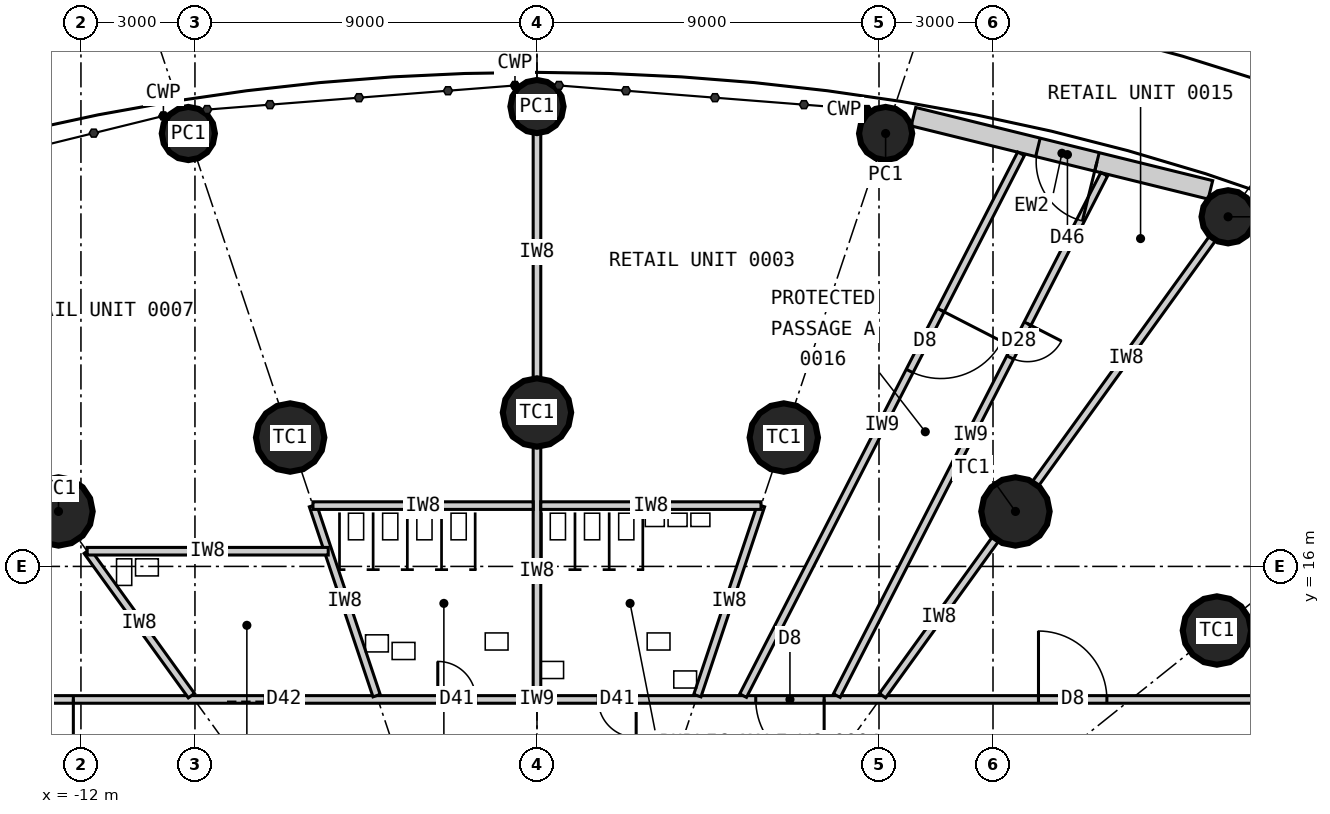
"""IFC4 building model, lengths in metres.
Left out: names, types, materials, properties, quantities, classifications, styles, units other than length and angle.
Written with IfcOpenShell. Run it as: python <this file> out.ifc"""

import sys

from ifc_helpers import new_model, si_unit, direction, frame, frame_2d, origin, origin_2d, place, context, subcontext, project, spatial, rectangle, circle, extrude, element, fill, save


model = new_model("IFC4")
c1 = context("Model", 3, precision=1e-05, world=origin(), true_north=direction((0.0, 1.0)))
c2 = subcontext(c1, "Body", "Model", "MODEL_VIEW")
j1 = project(units=[si_unit("LENGTHUNIT", "METRE"), si_unit("PLANEANGLEUNIT", "RADIAN")], contexts=[c1])
p1 = place(None, origin())
s1 = spatial("IfcSite", under=j1, at=p1, CompositionType="ELEMENT")
p2 = place(p1, origin())
s2 = spatial("IfcBuilding", under=s1, at=p2, CompositionType="ELEMENT")
p3 = place(p2, origin())
s3 = spatial("IfcBuildingStorey", under=s2, at=p3, CompositionType="ELEMENT", Elevation=0.0)
for number, where, z_axis, x_axis in (
    (1, (17.892, 14.313, 0.0), (0.0, 0.0, 1.0), (1.0, 0.0, 0.0)),
    (2, (12.591, 17.447, 0.0), (0.0, 0.0, 1.0), (1.0, 0.0, 0.0)),
    (3, (6.495, 19.391, 0.0), (0.0, 0.0, 1.0), (1.0, 0.0, 0.0)),
    (4, (0.0, 20.05, 0.0), (0.0, 0.0, 1.0), (1.0, 0.0, 0.0)),
    (5, (-6.495, 19.391, 0.0), (0.0, 0.0, 1.0), (1.0, 0.0, 0.0)),
    (6, (-12.591, 17.447, 0.0), (0.0, 0.0, 1.0), (1.0, 0.0, 0.0)),
):
    element("IfcColumn", number, at=place(p3, frame(where, z_axis=z_axis, x_axis=x_axis)), inside=s3, PredefinedType="COLUMN", context=c2, shape_type="SweptSolid", body=[
        extrude(circle(Radius=0.9, at=origin_2d()), origin(), (0.0, 0.0, 1.0), 7.2),
    ])
for number, where, z_axis, x_axis in (
    (7, (18.186, 25.199, 0.0), (0.0, 0.0, 1.0), (1.0, 0.0, 0.0)),
    (8, (9.174, 27.391, 0.0), (0.0, 0.0, 1.0), (1.0, 0.0, 0.0)),
    (9, (0.0, 28.1, 0.0), (0.0, 0.0, 1.0), (1.0, 0.0, 0.0)),
    (10, (-9.174, 27.391, 0.0), (0.0, 0.0, 1.0), (1.0, 0.0, 0.0)),
):
    element("IfcColumn", number, at=place(p3, frame(where, z_axis=z_axis, x_axis=x_axis)), inside=s3, PredefinedType="COLUMN", context=c2, shape_type="SweptSolid", body=[
        extrude(circle(Radius=0.7, at=origin_2d()), origin(), (0.0, 0.0, 1.0), 7.2),
    ])
p4 = place(p3, frame((17.721, 25.908, 0.0), z_axis=(0.0, 0.0, 1.0), x_axis=(-0.970964815964, 0.23922233625, 0.0)))
e11 = element("IfcWall", 11, at=p4, inside=s3, PredefinedType="SOLIDWALL", context=c2, shape_type="SweptSolid", body=[
    extrude(rectangle(XDim=8.048, YDim=0.5, at=frame_2d((4.024, 0.0))), origin(), (0.0, 0.0, 1.0), 6.95),
])
p5 = place(p4, frame((3.075, 0.0, 0.0)))
e12 = element("IfcOpeningElement", 12, at=p5, cuts=e11, PredefinedType="OPENING", context=c2, shape_type="SweptSolid", body=[
    extrude(rectangle(XDim=1.6, YDim=2.1, at=frame_2d((0.8, 1.05))), frame((0.0, 0.26, 0.0), z_axis=(0.0, -1.0, 0.0), x_axis=(1.0, 0.0, 0.0)), (0.0, 0.0, 1.0), 0.52),
])
p6 = place(p3, frame((-19.1, 12.5, 0.0), z_axis=(0.0, 0.0, 1.0), x_axis=(1.0, 0.0, 0.0)))
e13 = element("IfcWall", 13, at=p6, inside=s3, PredefinedType="PARTITIONING", context=c2, shape_type="SweptSolid", body=[
    extrude(rectangle(XDim=38.2, YDim=0.2, at=frame_2d((19.1, 0.0))), origin(), (0.0, 0.0, 1.0), 6.95),
])
p7 = place(p6, frame((32.297, 0.0, 0.0)))
e14 = element("IfcOpeningElement", 14, at=p7, cuts=e13, PredefinedType="OPENING", context=c2, shape_type="SweptSolid", body=[
    extrude(rectangle(XDim=1.8, YDim=2.4, at=frame_2d((0.9, 1.2))), frame((0.0, 0.11, 0.0), z_axis=(0.0, -1.0, 0.0), x_axis=(1.0, 0.0, 0.0)), (0.0, 0.0, 1.0), 0.22),
])
p8 = place(p6, frame((24.857, 0.0, 0.0)))
e15 = element("IfcOpeningElement", 15, at=p8, cuts=e13, PredefinedType="OPENING", context=c2, shape_type="SweptSolid", body=[
    extrude(rectangle(XDim=1.8, YDim=2.4, at=frame_2d((0.9, 1.2))), frame((0.0, 0.11, 0.0), z_axis=(0.0, -1.0, 0.0), x_axis=(1.0, 0.0, 0.0)), (0.0, 0.0, 1.0), 0.22),
])
p9 = place(p6, frame((20.71, 0.0, 0.0)))
e16 = element("IfcOpeningElement", 16, at=p9, cuts=e13, PredefinedType="OPENING", context=c2, shape_type="SweptSolid", body=[
    extrude(rectangle(XDim=1.0, YDim=2.1, at=frame_2d((0.5, 1.05))), frame((0.0, 0.11, 0.0), z_axis=(0.0, -1.0, 0.0), x_axis=(1.0, 0.0, 0.0)), (0.0, 0.0, 1.0), 0.22),
])
p10 = place(p6, frame((16.49, 0.0, 0.0)))
e17 = element("IfcOpeningElement", 17, at=p10, cuts=e13, PredefinedType="OPENING", context=c2, shape_type="SweptSolid", body=[
    extrude(rectangle(XDim=1.0, YDim=2.1, at=frame_2d((0.5, 1.05))), frame((0.0, 0.11, 0.0), z_axis=(0.0, -1.0, 0.0), x_axis=(1.0, 0.0, 0.0)), (0.0, 0.0, 1.0), 0.22),
])
p11 = place(p6, frame((11.943, 0.0, 0.0)))
e18 = element("IfcOpeningElement", 18, at=p11, cuts=e13, PredefinedType="OPENING", context=c2, shape_type="SweptSolid", body=[
    extrude(rectangle(XDim=1.0, YDim=2.2, at=frame_2d((0.5, 1.1))), frame((0.0, 0.11, 0.0), z_axis=(0.0, -1.0, 0.0), x_axis=(1.0, 0.0, 0.0)), (0.0, 0.0, 1.0), 0.22),
])
p12 = place(p6, frame((5.1, 0.0, 0.0)))
e19 = element("IfcOpeningElement", 19, at=p12, cuts=e13, PredefinedType="OPENING", context=c2, shape_type="SweptSolid", body=[
    extrude(rectangle(XDim=1.8, YDim=2.4, at=frame_2d((0.9, 1.2))), frame((0.0, 0.11, 0.0), z_axis=(0.0, -1.0, 0.0), x_axis=(1.0, 0.0, 0.0)), (0.0, 0.0, 1.0), 0.22),
])
p13 = place(p3, frame((9.093, 12.6, 0.0), z_axis=(0.0, 0.0, 1.0), x_axis=(0.58522538525, 0.810870673079, 0.0)))
e20 = element("IfcWall", 20, at=p13, inside=s3, PredefinedType="PARTITIONING", context=c2, shape_type="SweptSolid", body=[
    extrude(rectangle(XDim=5.077, YDim=0.2, at=frame_2d((2.538, 0.0))), origin(), (0.0, 0.0, 1.0), 6.1),
])
p14 = place(p3, frame((13.118, 18.176, 0.0), z_axis=(0.0, 0.0, 1.0), x_axis=(0.585204349301, 0.810885854828, 0.0)))
e21 = element("IfcWall", 21, at=p14, inside=s3, PredefinedType="PARTITIONING", context=c2, shape_type="SweptSolid", body=[
    extrude(rectangle(XDim=8.161, YDim=0.2, at=frame_2d((4.081, 0.0))), origin(), (0.0, 0.0, 1.0), 6.05),
])
p15 = place(p3, frame((4.22, 12.6, 0.0), z_axis=(0.0, 0.0, 1.0), x_axis=(0.317574790206, 0.948233226915, 0.0)))
e22 = element("IfcWall", 22, at=p15, inside=s3, PredefinedType="PARTITIONING", context=c2, shape_type="SweptSolid", body=[
    extrude(rectangle(XDim=5.273, YDim=0.2, at=frame_2d((2.636, 0.0))), origin(), (0.0, 0.0, 1.0), 6.1),
])
p16 = place(p3, frame((0.0, 12.6, 0.0), z_axis=(0.0, 0.0, 1.0), x_axis=(0.0, 1.0, 0.0)))
e23 = element("IfcWall", 23, at=p16, inside=s3, PredefinedType="PARTITIONING", context=c2, shape_type="SweptSolid", body=[
    extrude(rectangle(XDim=6.55, YDim=0.2, at=frame_2d((3.275, 0.0))), origin(), (0.0, 0.0, 1.0), 6.1),
])
p17 = place(p3, frame((0.0, 20.95, 0.0), z_axis=(0.0, 0.0, 1.0), x_axis=(0.0, 1.0, 0.0)))
e24 = element("IfcWall", 24, at=p17, inside=s3, PredefinedType="PARTITIONING", context=c2, shape_type="SweptSolid", body=[
    extrude(rectangle(XDim=6.65, YDim=0.2, at=frame_2d((3.325, 0.0))), origin(), (0.0, 0.0, 1.0), 6.05),
])
p18 = place(p3, frame((-4.22, 12.6, 0.0), z_axis=(0.0, 0.0, 1.0), x_axis=(-0.317574790206, 0.948233226915, 0.0)))
e25 = element("IfcWall", 25, at=p18, inside=s3, PredefinedType="PARTITIONING", context=c2, shape_type="SweptSolid", body=[
    extrude(rectangle(XDim=5.273, YDim=0.2, at=frame_2d((2.636, 0.0))), origin(), (0.0, 0.0, 1.0), 6.1),
])
p19 = place(p3, frame((-9.093, 12.6, 0.0), z_axis=(0.0, 0.0, 1.0), x_axis=(-0.585228020299, 0.810868771292, 0.0)))
e26 = element("IfcWall", 26, at=p19, inside=s3, PredefinedType="PARTITIONING", context=c2, shape_type="SweptSolid", body=[
    extrude(rectangle(XDim=4.686, YDim=0.2, at=frame_2d((2.343, 0.0))), origin(), (0.0, 0.0, 1.0), 6.1),
])
for number, where, z_axis, x_axis in (
    (27, (5.895, 17.6, 0.0), (0.0, 0.0, 1.0), (-1.0, 0.0, 0.0)),
    (28, (-0.1, 17.6, 0.0), (0.0, 0.0, 1.0), (-1.0, 0.0, 0.0)),
):
    element("IfcWall", number, at=place(p3, frame(where, z_axis=z_axis, x_axis=x_axis)), inside=s3, PredefinedType="PARTITIONING", context=c2, shape_type="SweptSolid", body=[
        extrude(rectangle(XDim=5.795, YDim=0.2, at=frame_2d((2.897, 0.0))), origin(), (0.0, 0.0, 1.0), 6.95),
    ])
p20 = place(p3, frame((-5.493, 16.4, 0.0), z_axis=(0.0, 0.0, 1.0), x_axis=(-1.0, 0.0, 0.0)))
e29 = element("IfcWall", 29, at=p20, inside=s3, PredefinedType="PARTITIONING", context=c2, shape_type="SweptSolid", body=[
    extrude(rectangle(XDim=6.343, YDim=0.2, at=frame_2d((3.171, 0.0))), origin(), (0.0, 0.0, 1.0), 6.3),
])
p21 = place(p3, frame((5.424, 12.6, 0.0), z_axis=(0.0, 0.0, 1.0), x_axis=(0.456404491308, 0.889772409279, 0.0)))
e30 = element("IfcWall", 30, at=p21, inside=s3, PredefinedType="PARTITIONING", context=c2, shape_type="SweptSolid", body=[
    extrude(rectangle(XDim=16.024, YDim=0.2, at=frame_2d((8.012, 0.0))), origin(), (0.0, 0.0, 1.0), 6.95),
])
p22 = place(p21, frame((9.6, 0.0, 0.0)))
e31 = element("IfcOpeningElement", 31, at=p22, cuts=e30, PredefinedType="OPENING", context=c2, shape_type="SweptSolid", body=[
    extrude(rectangle(XDim=1.8, YDim=2.4, at=frame_2d((0.9, 1.2))), frame((0.0, 0.11, 0.0), z_axis=(0.0, -1.0, 0.0), x_axis=(1.0, 0.0, 0.0)), (0.0, 0.0, 1.0), 0.22),
])
p23 = place(p3, frame((14.926, 26.319, 0.0), z_axis=(0.0, 0.0, 1.0), x_axis=(-0.456399263904, -0.889775090631, 0.0)))
e32 = element("IfcWall", 32, at=p23, inside=s3, PredefinedType="PARTITIONING", context=c2, shape_type="SweptSolid", body=[
    extrude(rectangle(XDim=15.418, YDim=0.2, at=frame_2d((7.709, 0.0))), origin(), (0.0, 0.0, 1.0), 6.95),
])
p24 = place(p23, frame((4.418, 0.0, 0.0)))
e33 = element("IfcOpeningElement", 33, at=p24, cuts=e32, PredefinedType="OPENING", context=c2, shape_type="SweptSolid", body=[
    extrude(rectangle(XDim=1.0, YDim=2.2, at=frame_2d((0.5, 1.1))), frame((0.0, 0.11, 0.0), z_axis=(0.0, -1.0, 0.0), x_axis=(1.0, 0.0, 0.0)), (0.0, 0.0, 1.0), 0.22),
])
p25 = place(p5, origin())
e34 = element("IfcDoor", 34, at=p25, inside=s3, OperationType="DOUBLE_DOOR_DOUBLE_SWING", PredefinedType="DOOR", context=c2, shape_type="SweptSolid", body=[
    extrude(rectangle(XDim=1.6, YDim=2.1, at=frame_2d((0.8, 1.05))), frame((0.0, 0.025, 0.0), z_axis=(0.0, -1.0, 0.0), x_axis=(1.0, 0.0, 0.0)), (0.0, 0.0, 1.0), 0.05),
])
fill(e12, e34)
p26 = place(p7, origin())
e35 = element("IfcDoor", 35, at=p26, inside=s3, OperationType="DOUBLE_DOOR_DOUBLE_SWING", PredefinedType="DOOR", context=c2, shape_type="SweptSolid", body=[
    extrude(rectangle(XDim=1.8, YDim=2.4, at=frame_2d((0.9, 1.2))), frame((0.0, 0.025, 0.0), z_axis=(0.0, -1.0, 0.0), x_axis=(1.0, 0.0, 0.0)), (0.0, 0.0, 1.0), 0.05),
])
fill(e14, e35)
p27 = place(p8, origin())
e36 = element("IfcDoor", 36, at=p27, inside=s3, OperationType="DOUBLE_DOOR_DOUBLE_SWING", PredefinedType="DOOR", context=c2, shape_type="SweptSolid", body=[
    extrude(rectangle(XDim=1.8, YDim=2.4, at=frame_2d((0.9, 1.2))), frame((0.0, 0.025, 0.0), z_axis=(0.0, -1.0, 0.0), x_axis=(1.0, 0.0, 0.0)), (0.0, 0.0, 1.0), 0.05),
])
fill(e15, e36)
p28 = place(p9, origin())
e37 = element("IfcDoor", 37, at=p28, inside=s3, OperationType="SINGLE_SWING_RIGHT", PredefinedType="DOOR", context=c2, shape_type="SweptSolid", body=[
    extrude(rectangle(XDim=1.0, YDim=2.1, at=frame_2d((0.5, 1.05))), frame((0.0, 0.025, 0.0), z_axis=(0.0, -1.0, 0.0), x_axis=(1.0, 0.0, 0.0)), (0.0, 0.0, 1.0), 0.05),
])
fill(e16, e37)
p29 = place(p10, origin())
e38 = element("IfcDoor", 38, at=p29, inside=s3, OperationType="SINGLE_SWING_LEFT", PredefinedType="DOOR", context=c2, shape_type="SweptSolid", body=[
    extrude(rectangle(XDim=1.0, YDim=2.1, at=frame_2d((0.5, 1.05))), frame((0.0, 0.025, 0.0), z_axis=(0.0, -1.0, 0.0), x_axis=(1.0, 0.0, 0.0)), (0.0, 0.0, 1.0), 0.05),
])
fill(e17, e38)
p30 = place(p11, origin())
e39 = element("IfcDoor", 39, at=p30, inside=s3, OperationType="SLIDING_TO_LEFT", PredefinedType="DOOR", context=c2, shape_type="SweptSolid", body=[
    extrude(rectangle(XDim=1.0, YDim=2.2, at=frame_2d((0.5, 1.1))), frame((0.0, 0.025, 0.0), z_axis=(0.0, -1.0, 0.0), x_axis=(1.0, 0.0, 0.0)), (0.0, 0.0, 1.0), 0.05),
])
fill(e18, e39)
p31 = place(p12, origin())
e40 = element("IfcDoor", 40, at=p31, inside=s3, OperationType="DOUBLE_DOOR_DOUBLE_SWING", PredefinedType="DOOR", context=c2, shape_type="SweptSolid", body=[
    extrude(rectangle(XDim=1.8, YDim=2.4, at=frame_2d((0.9, 1.2))), frame((0.0, 0.025, 0.0), z_axis=(0.0, -1.0, 0.0), x_axis=(1.0, 0.0, 0.0)), (0.0, 0.0, 1.0), 0.05),
])
fill(e19, e40)
p32 = place(p22, origin())
e41 = element("IfcDoor", 41, at=p32, inside=s3, OperationType="DOUBLE_DOOR_DOUBLE_SWING", PredefinedType="DOOR", context=c2, shape_type="SweptSolid", body=[
    extrude(rectangle(XDim=1.8, YDim=2.4, at=frame_2d((0.9, 1.2))), frame((0.0, 0.025, 0.0), z_axis=(0.0, -1.0, 0.0), x_axis=(1.0, 0.0, 0.0)), (0.0, 0.0, 1.0), 0.05),
])
fill(e31, e41)
p33 = place(p24, origin())
e42 = element("IfcDoor", 42, at=p33, inside=s3, OperationType="SINGLE_SWING_LEFT", PredefinedType="DOOR", context=c2, shape_type="SweptSolid", body=[
    extrude(rectangle(XDim=1.0, YDim=2.2, at=frame_2d((0.5, 1.1))), frame((0.0, 0.025, 0.0), z_axis=(0.0, -1.0, 0.0), x_axis=(1.0, 0.0, 0.0)), (0.0, 0.0, 1.0), 0.05),
])
fill(e33, e42)
save(model, sys.argv[1])
